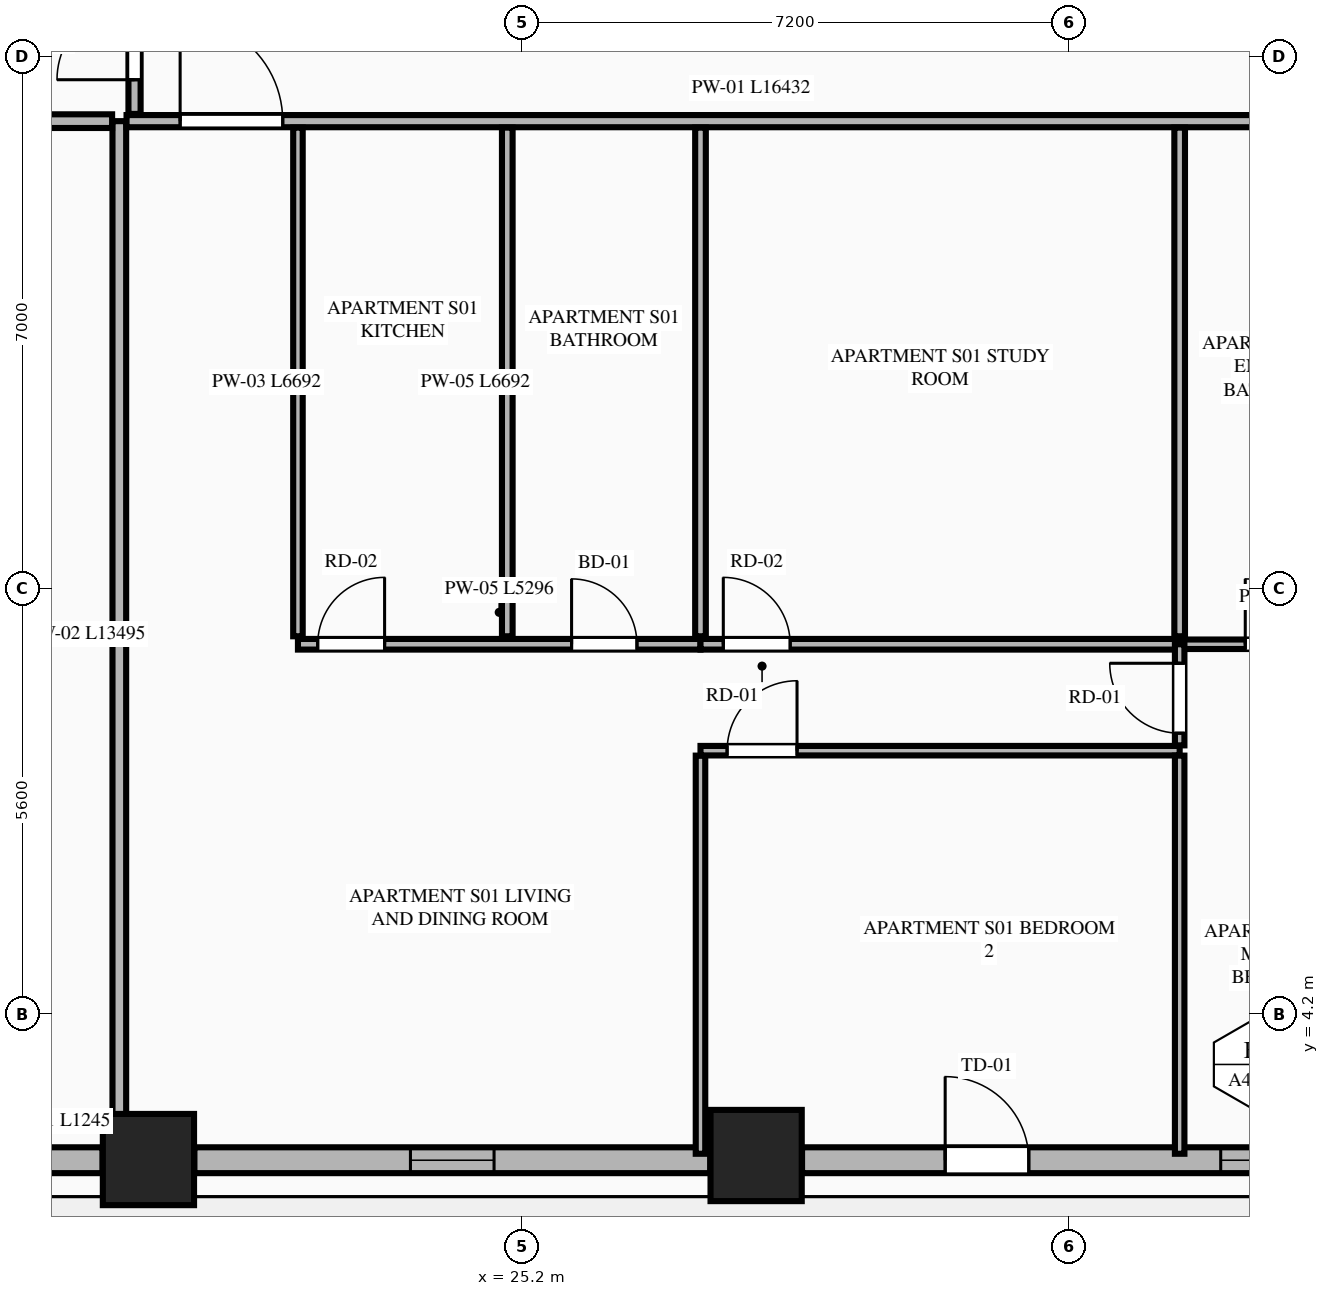
"""IFC4 building model, lengths in metres.
Left out: names, types, materials, properties, quantities, classifications, styles, units other than length and angle.
Written with IfcOpenShell. Run it as: python <this file> out.ifc"""

import sys

from ifc_helpers import new_model, si_unit, direction, frame, frame_2d, origin, origin_2d, place, context, subcontext, project, spatial, rectangle, extrude, element, fill, save


model = new_model("IFC4")
c1 = context("Model", 3, precision=1e-05, world=origin(), true_north=direction((0.0, 1.0)))
c2 = subcontext(c1, "Body", "Model", "MODEL_VIEW")
j1 = project(units=[si_unit("LENGTHUNIT", "METRE"), si_unit("PLANEANGLEUNIT", "RADIAN")], contexts=[c1])
p1 = place(None, origin())
s1 = spatial("IfcSite", under=j1, at=p1, CompositionType="ELEMENT")
p2 = place(p1, origin())
s2 = spatial("IfcBuilding", under=s1, at=p2, CompositionType="ELEMENT")
p3 = place(p2, frame((0.0, 0.0, 53.3)))
s3 = spatial("IfcBuildingStorey", under=s2, at=p3, CompositionType="ELEMENT", Elevation=53.3)
for number, where, z_axis, x_axis in (
    (1, (20.283, 2.289, 0.0), (0.0, 0.0, 1.0), (1.0, 0.0, 0.0)),
    (2, (28.278, 2.342, 0.0), (0.0, 0.0, 1.0), (1.0, 0.0, 0.0)),
):
    element("IfcColumn", number, at=place(p3, frame(where, z_axis=z_axis, x_axis=x_axis)), inside=s3, PredefinedType="COLUMN", context=c2, shape_type="SweptSolid", body=[
        extrude(rectangle(XDim=1.2, YDim=1.2, at=origin_2d()), origin(), (0.0, 0.0, 1.0), 3.55),
    ])
p4 = place(p3, frame((18.434, 2.28, 0.0), z_axis=(0.0, 0.0, 1.0), x_axis=(1.0, 0.0, 0.0)))
e3 = element("IfcWall", 3, at=p4, inside=s3, PredefinedType="STANDARD", context=c2, shape_type="SweptSolid", body=[
    extrude(rectangle(XDim=1.245, YDim=0.34, at=frame_2d((0.623, 0.0))), origin(), (0.0, 0.0, 1.0), 3.33),
])
p5 = place(p3, frame((20.887, 2.28, 0.0), z_axis=(0.0, 0.0, 1.0), x_axis=(1.0, 0.0, 0.0)))
e4 = element("IfcWall", 4, at=p5, inside=s3, PredefinedType="STANDARD", context=c2, shape_type="SweptSolid", body=[
    extrude(rectangle(XDim=6.787, YDim=0.34, at=frame_2d((3.394, 0.0))), origin(), (0.0, 0.0, 1.0), 2.787),
])
p6 = place(p5, frame((2.843, 0.0, 0.75)))
e5 = element("IfcOpeningElement", 5, at=p6, cuts=e4, PredefinedType="OPENING", context=c2, shape_type="SweptSolid", body=[
    extrude(rectangle(XDim=1.1, YDim=1.887, at=frame_2d((0.55, 0.943))), frame((0.0, 0.18, 0.0), z_axis=(0.0, -1.0, 0.0), x_axis=(1.0, 0.0, 0.0)), (0.0, 0.0, 1.0), 0.36),
])
p7 = place(p3, frame((28.882, 2.28, 0.0), z_axis=(0.0, 0.0, 1.0), x_axis=(1.0, 0.0, 0.0)))
e6 = element("IfcWall", 6, at=p7, inside=s3, PredefinedType="STANDARD", context=c2, shape_type="SweptSolid", body=[
    extrude(rectangle(XDim=7.036, YDim=0.34, at=frame_2d((3.518, 0.0))), origin(), (0.0, 0.0, 1.0), 2.787),
])
p8 = place(p7, frame((1.883, 0.0, 0.0)))
e7 = element("IfcOpeningElement", 7, at=p8, cuts=e6, PredefinedType="OPENING", context=c2, shape_type="SweptSolid", body=[
    extrude(rectangle(XDim=1.1, YDim=2.25, at=frame_2d((0.55, 1.125))), frame((0.0, 0.18, 0.0), z_axis=(0.0, -1.0, 0.0), x_axis=(1.0, 0.0, 0.0)), (0.0, 0.0, 1.0), 0.36),
])
p9 = place(p7, frame((5.508, 0.0, 0.75)))
e8 = element("IfcOpeningElement", 8, at=p9, cuts=e6, PredefinedType="OPENING", context=c2, shape_type="SweptSolid", body=[
    extrude(rectangle(XDim=1.1, YDim=1.887, at=frame_2d((0.55, 0.943))), frame((0.0, 0.18, 0.0), z_axis=(0.0, -1.0, 0.0), x_axis=(1.0, 0.0, 0.0)), (0.0, 0.0, 1.0), 0.36),
])
p10 = place(p3, frame((19.9, 2.455, 0.0), z_axis=(0.0, 0.0, 1.0), x_axis=(0.0, 1.0, 0.0)))
e9 = element("IfcWall", 9, at=p10, inside=s3, PredefinedType="PARTITIONING", context=c2, shape_type="SweptSolid", body=[
    extrude(rectangle(XDim=13.495, YDim=0.18, at=frame_2d((6.748, 0.0))), origin(), (0.0, 0.0, 1.0), 3.33),
])
p11 = place(p3, frame((19.995, 15.95, 0.0), z_axis=(0.0, 0.0, 1.0), x_axis=(1.0, 0.0, 0.0)))
e10 = element("IfcWall", 10, at=p11, inside=s3, PredefinedType="PARTITIONING", context=c2, shape_type="SweptSolid", body=[
    extrude(rectangle(XDim=16.432, YDim=0.16, at=frame_2d((8.216, 0.0))), origin(), (0.0, 0.0, 1.0), 3.33),
])
p12 = place(p11, frame((0.705, 0.0, 0.0)))
e11 = element("IfcOpeningElement", 11, at=p12, cuts=e10, PredefinedType="OPENING", context=c2, shape_type="SweptSolid", body=[
    extrude(rectangle(XDim=1.35, YDim=2.35, at=frame_2d((0.675, 1.175))), frame((0.0, 0.09, 0.0), z_axis=(0.0, -1.0, 0.0), x_axis=(1.0, 0.0, 0.0)), (0.0, 0.0, 1.0), 0.18),
])
p13 = place(p3, frame((22.25, 9.173, 0.0), z_axis=(0.0, 0.0, 1.0), x_axis=(0.0, 1.0, 0.0)))
e12 = element("IfcWall", 12, at=p13, inside=s3, PredefinedType="PARTITIONING", context=c2, shape_type="SweptSolid", body=[
    extrude(rectangle(XDim=6.692, YDim=0.125, at=frame_2d((3.346, 0.0))), origin(), (0.0, 0.0, 1.0), 2.637),
])
p14 = place(p3, frame((22.25, 9.068, 0.0), z_axis=(0.0, 0.0, 1.0), x_axis=(1.0, 0.0, 0.0)))
e13 = element("IfcWall", 13, at=p14, inside=s3, PredefinedType="PLUMBINGWALL", context=c2, shape_type="SweptSolid", body=[
    extrude(rectangle(XDim=5.296, YDim=0.14, at=frame_2d((2.648, 0.0))), origin(), (0.0, 0.0, 1.0), 3.33),
])
p15 = place(p14, frame((3.6, 0.0, 0.0)))
e14 = element("IfcOpeningElement", 14, at=p15, cuts=e13, PredefinedType="OPENING", context=c2, shape_type="SweptSolid", body=[
    extrude(rectangle(XDim=0.86, YDim=2.1, at=frame_2d((0.43, 1.05))), frame((0.0, 0.08, 0.0), z_axis=(0.0, -1.0, 0.0), x_axis=(1.0, 0.0, 0.0)), (0.0, 0.0, 1.0), 0.16),
])
p16 = place(p14, frame((0.26, 0.0, 0.0)))
e15 = element("IfcOpeningElement", 15, at=p16, cuts=e13, PredefinedType="OPENING", context=c2, shape_type="SweptSolid", body=[
    extrude(rectangle(XDim=0.88, YDim=2.15, at=frame_2d((0.44, 1.075))), frame((0.0, 0.08, 0.0), z_axis=(0.0, -1.0, 0.0), x_axis=(1.0, 0.0, 0.0)), (0.0, 0.0, 1.0), 0.16),
])
p17 = place(p3, frame((27.546, 9.068, 0.0), z_axis=(0.0, 0.0, 1.0), x_axis=(1.0, 0.0, 0.0)))
e16 = element("IfcWall", 16, at=p17, inside=s3, PredefinedType="PLUMBINGWALL", context=c2, shape_type="SweptSolid", body=[
    extrude(rectangle(XDim=6.304, YDim=0.14, at=frame_2d((3.152, 0.0))), origin(), (0.0, 0.0, 1.0), 3.33),
])
p18 = place(p17, frame((0.3, 0.0, 0.0)))
e17 = element("IfcOpeningElement", 17, at=p18, cuts=e16, PredefinedType="OPENING", context=c2, shape_type="SweptSolid", body=[
    extrude(rectangle(XDim=0.88, YDim=2.15, at=frame_2d((0.44, 1.075))), frame((0.0, 0.08, 0.0), z_axis=(0.0, -1.0, 0.0), x_axis=(1.0, 0.0, 0.0)), (0.0, 0.0, 1.0), 0.16),
])
p19 = place(p3, frame((33.85, 9.068, 0.0), z_axis=(0.0, 0.0, 1.0), x_axis=(1.0, 0.0, 0.0)))
e18 = element("IfcWall", 18, at=p19, inside=s3, PredefinedType="PARTITIONING", context=c2, shape_type="SweptSolid", body=[
    extrude(rectangle(XDim=2.577, YDim=0.125, at=frame_2d((1.289, 0.0))), origin(), (0.0, 0.0, 1.0), 3.33),
])
p20 = place(p19, frame((0.863, 0.0, 0.0)))
e19 = element("IfcOpeningElement", 19, at=p20, cuts=e18, PredefinedType="OPENING", context=c2, shape_type="SweptSolid", body=[
    extrude(rectangle(XDim=0.86, YDim=2.1, at=frame_2d((0.43, 1.05))), frame((0.0, 0.073, 0.0), z_axis=(0.0, -1.0, 0.0), x_axis=(1.0, 0.0, 0.0)), (0.0, 0.0, 1.0), 0.145),
])
p21 = place(p3, frame((25.004, 9.173, 0.0), z_axis=(0.0, 0.0, 1.0), x_axis=(0.0, 1.0, 0.0)))
e20 = element("IfcWall", 20, at=p21, inside=s3, PredefinedType="PLUMBINGWALL", context=c2, shape_type="SweptSolid", body=[
    extrude(rectangle(XDim=6.692, YDim=0.14, at=frame_2d((3.346, 0.0))), origin(), (0.0, 0.0, 1.0), 3.33),
])
p22 = place(p3, frame((27.546, 2.365, 0.0), z_axis=(0.0, 0.0, 1.0), x_axis=(0.0, 1.0, 0.0)))
e21 = element("IfcWall", 21, at=p22, inside=s3, PredefinedType="PARTITIONING", context=c2, shape_type="SweptSolid", body=[
    extrude(rectangle(XDim=5.238, YDim=0.125, at=frame_2d((2.619, 0.0))), origin(), (0.0, 0.0, 1.0), 3.33),
])
p23 = place(p3, frame((27.546, 7.668, 0.0), z_axis=(0.0, 0.0, 1.0), x_axis=(1.0, 0.0, 0.0)))
e22 = element("IfcWall", 22, at=p23, inside=s3, PredefinedType="PARTITIONING", context=c2, shape_type="SweptSolid", body=[
    extrude(rectangle(XDim=6.304, YDim=0.125, at=frame_2d((3.152, 0.0))), origin(), (0.0, 0.0, 1.0), 3.33),
])
p24 = place(p23, frame((0.35, 0.0, 0.0)))
e23 = element("IfcOpeningElement", 23, at=p24, cuts=e22, PredefinedType="OPENING", context=c2, shape_type="SweptSolid", body=[
    extrude(rectangle(XDim=0.92, YDim=2.15, at=frame_2d((0.46, 1.075))), frame((0.0, 0.073, 0.0), z_axis=(0.0, -1.0, 0.0), x_axis=(1.0, 0.0, 0.0)), (0.0, 0.0, 1.0), 0.145),
])
p25 = place(p3, frame((33.85, 7.738, 0.0), z_axis=(0.0, 0.0, 1.0), x_axis=(0.0, 1.0, 0.0)))
e24 = element("IfcWall", 24, at=p25, inside=s3, PredefinedType="PARTITIONING", context=c2, shape_type="SweptSolid", body=[
    extrude(rectangle(XDim=1.33, YDim=0.125, at=frame_2d((0.665, 0.0))), origin(), (0.0, 0.0, 1.0), 3.33),
])
p26 = place(p25, frame((0.16, 0.0, 0.0)))
e25 = element("IfcOpeningElement", 25, at=p26, cuts=e24, PredefinedType="OPENING", context=c2, shape_type="SweptSolid", body=[
    extrude(rectangle(XDim=0.92, YDim=2.15, at=frame_2d((0.46, 1.075))), frame((0.0, 0.073, 0.0), z_axis=(0.0, -1.0, 0.0), x_axis=(1.0, 0.0, 0.0)), (0.0, 0.0, 1.0), 0.145),
])
for number, where, z_axis, x_axis in (
    (26, (27.546, 9.173, 0.0), (0.0, 0.0, 1.0), (0.0, 1.0, 0.0)),
    (27, (33.85, 9.173, 0.0), (0.0, 0.0, 1.0), (0.0, 1.0, 0.0)),
):
    element("IfcWall", number, at=place(p3, frame(where, z_axis=z_axis, x_axis=x_axis)), inside=s3, PredefinedType="PLUMBINGWALL", context=c2, shape_type="SweptSolid", body=[
        extrude(rectangle(XDim=6.692, YDim=0.14, at=frame_2d((3.346, 0.0))), origin(), (0.0, 0.0, 1.0), 3.33),
    ])
p27 = place(p3, frame((33.85, 2.365, 0.0), z_axis=(0.0, 0.0, 1.0), x_axis=(0.0, 1.0, 0.0)))
e28 = element("IfcWall", 28, at=p27, inside=s3, PredefinedType="PARTITIONING", context=c2, shape_type="SweptSolid", body=[
    extrude(rectangle(XDim=5.238, YDim=0.125, at=frame_2d((2.619, 0.0))), origin(), (0.0, 0.0, 1.0), 3.33),
])
p28 = place(p3, frame((10.564, 15.95, 0.0), z_axis=(0.0, 0.0, 1.0), x_axis=(1.0, 0.0, 0.0)))
e29 = element("IfcWall", 29, at=p28, inside=s3, PredefinedType="PARTITIONING", context=c2, shape_type="SweptSolid", body=[
    extrude(rectangle(XDim=9.241, YDim=0.18, at=frame_2d((4.621, 0.0))), origin(), (0.0, 0.0, 1.0), 3.33),
])
p29 = place(p3, frame((20.1, 16.045, 0.0), z_axis=(0.0, 0.0, 1.0), x_axis=(0.0, 1.0, 0.0)))
e30 = element("IfcWall", 30, at=p29, inside=s3, PredefinedType="PARTITIONING", context=c2, shape_type="SweptSolid", body=[
    extrude(rectangle(XDim=19.71, YDim=0.16, at=frame_2d((9.855, 0.0))), origin(), (0.0, 0.0, 1.0), 3.33),
])
p30 = place(p29, frame((0.45, 0.0, 0.0)))
e31 = element("IfcOpeningElement", 31, at=p30, cuts=e30, PredefinedType="OPENING", context=c2, shape_type="SweptSolid", body=[
    extrude(rectangle(XDim=1.02, YDim=2.25, at=frame_2d((0.51, 1.125))), frame((0.0, 0.09, 0.0), z_axis=(0.0, -1.0, 0.0), x_axis=(1.0, 0.0, 0.0)), (0.0, 0.0, 1.0), 0.18),
])
p31 = place(p6, origin())
e32 = element("IfcWindow", 32, at=p31, inside=s3, PartitioningType="SINGLE_PANEL", PredefinedType="WINDOW", context=c2, shape_type="SweptSolid", body=[
    extrude(rectangle(XDim=1.1, YDim=1.887, at=frame_2d((0.55, 0.943))), frame((0.0, 0.03, 0.0), z_axis=(0.0, -1.0, 0.0), x_axis=(1.0, 0.0, 0.0)), (0.0, 0.0, 1.0), 0.06),
])
fill(e5, e32)
p32 = place(p8, origin())
e33 = element("IfcDoor", 33, at=p32, inside=s3, OperationType="SINGLE_SWING_LEFT", PredefinedType="DOOR", context=c2, shape_type="SweptSolid", body=[
    extrude(rectangle(XDim=1.1, YDim=2.25, at=frame_2d((0.55, 1.125))), frame((0.0, 0.025, 0.0), z_axis=(0.0, -1.0, 0.0), x_axis=(1.0, 0.0, 0.0)), (0.0, 0.0, 1.0), 0.05),
])
fill(e7, e33)
p33 = place(p15, origin())
e34 = element("IfcDoor", 34, at=p33, inside=s3, OperationType="SINGLE_SWING_LEFT", PredefinedType="DOOR", context=c2, shape_type="SweptSolid", body=[
    extrude(rectangle(XDim=0.86, YDim=2.1, at=frame_2d((0.43, 1.05))), frame((0.0, 0.025, 0.0), z_axis=(0.0, -1.0, 0.0), x_axis=(1.0, 0.0, 0.0)), (0.0, 0.0, 1.0), 0.05),
])
fill(e14, e34)
p34 = place(p20, origin())
e35 = element("IfcDoor", 35, at=p34, inside=s3, OperationType="SINGLE_SWING_LEFT", PredefinedType="DOOR", context=c2, shape_type="SweptSolid", body=[
    extrude(rectangle(XDim=0.86, YDim=2.1, at=frame_2d((0.43, 1.05))), frame((0.0, 0.025, 0.0), z_axis=(0.0, -1.0, 0.0), x_axis=(1.0, 0.0, 0.0)), (0.0, 0.0, 1.0), 0.05),
])
fill(e19, e35)
p35 = place(p12, origin())
e36 = element("IfcDoor", 36, at=p35, inside=s3, OperationType="SINGLE_SWING_LEFT", PredefinedType="DOOR", context=c2, shape_type="SweptSolid", body=[
    extrude(rectangle(XDim=1.35, YDim=2.35, at=frame_2d((0.675, 1.175))), frame((0.0, 0.025, 0.0), z_axis=(0.0, -1.0, 0.0), x_axis=(1.0, 0.0, 0.0)), (0.0, 0.0, 1.0), 0.05),
])
fill(e11, e36)
p36 = place(p16, origin())
e37 = element("IfcDoor", 37, at=p36, inside=s3, OperationType="SINGLE_SWING_RIGHT", PredefinedType="DOOR", context=c2, shape_type="SweptSolid", body=[
    extrude(rectangle(XDim=0.88, YDim=2.15, at=frame_2d((0.44, 1.075))), frame((0.0, 0.025, 0.0), z_axis=(0.0, -1.0, 0.0), x_axis=(1.0, 0.0, 0.0)), (0.0, 0.0, 1.0), 0.05),
])
fill(e15, e37)
p37 = place(p18, origin())
e38 = element("IfcDoor", 38, at=p37, inside=s3, OperationType="SINGLE_SWING_LEFT", PredefinedType="DOOR", context=c2, shape_type="SweptSolid", body=[
    extrude(rectangle(XDim=0.88, YDim=2.15, at=frame_2d((0.44, 1.075))), frame((0.0, 0.025, 0.0), z_axis=(0.0, -1.0, 0.0), x_axis=(1.0, 0.0, 0.0)), (0.0, 0.0, 1.0), 0.05),
])
fill(e17, e38)
p38 = place(p24, origin())
e39 = element("IfcDoor", 39, at=p38, inside=s3, OperationType="SINGLE_SWING_RIGHT", PredefinedType="DOOR", context=c2, shape_type="SweptSolid", body=[
    extrude(rectangle(XDim=0.92, YDim=2.15, at=frame_2d((0.46, 1.075))), frame((0.0, 0.025, 0.0), z_axis=(0.0, -1.0, 0.0), x_axis=(1.0, 0.0, 0.0)), (0.0, 0.0, 1.0), 0.05),
])
fill(e23, e39)
p39 = place(p26, origin())
e40 = element("IfcDoor", 40, at=p39, inside=s3, OperationType="SINGLE_SWING_RIGHT", PredefinedType="DOOR", context=c2, shape_type="SweptSolid", body=[
    extrude(rectangle(XDim=0.92, YDim=2.15, at=frame_2d((0.46, 1.075))), frame((0.0, 0.025, 0.0), z_axis=(0.0, -1.0, 0.0), x_axis=(1.0, 0.0, 0.0)), (0.0, 0.0, 1.0), 0.05),
])
fill(e25, e40)
p40 = place(p30, origin())
e41 = element("IfcDoor", 41, at=p40, inside=s3, OperationType="SINGLE_SWING_LEFT", PredefinedType="DOOR", context=c2, shape_type="SweptSolid", body=[
    extrude(rectangle(XDim=1.02, YDim=2.25, at=frame_2d((0.51, 1.125))), frame((0.0, 0.025, 0.0), z_axis=(0.0, -1.0, 0.0), x_axis=(1.0, 0.0, 0.0)), (0.0, 0.0, 1.0), 0.05),
])
fill(e31, e41)
p41 = place(p9, origin())
e42 = element("IfcWindow", 42, at=p41, inside=s3, PartitioningType="SINGLE_PANEL", PredefinedType="WINDOW", context=c2, shape_type="SweptSolid", body=[
    extrude(rectangle(XDim=1.1, YDim=1.887, at=frame_2d((0.55, 0.943))), frame((0.0, 0.03, 0.0), z_axis=(0.0, -1.0, 0.0), x_axis=(1.0, 0.0, 0.0)), (0.0, 0.0, 1.0), 0.06),
])
fill(e8, e42)
save(model, sys.argv[1])
